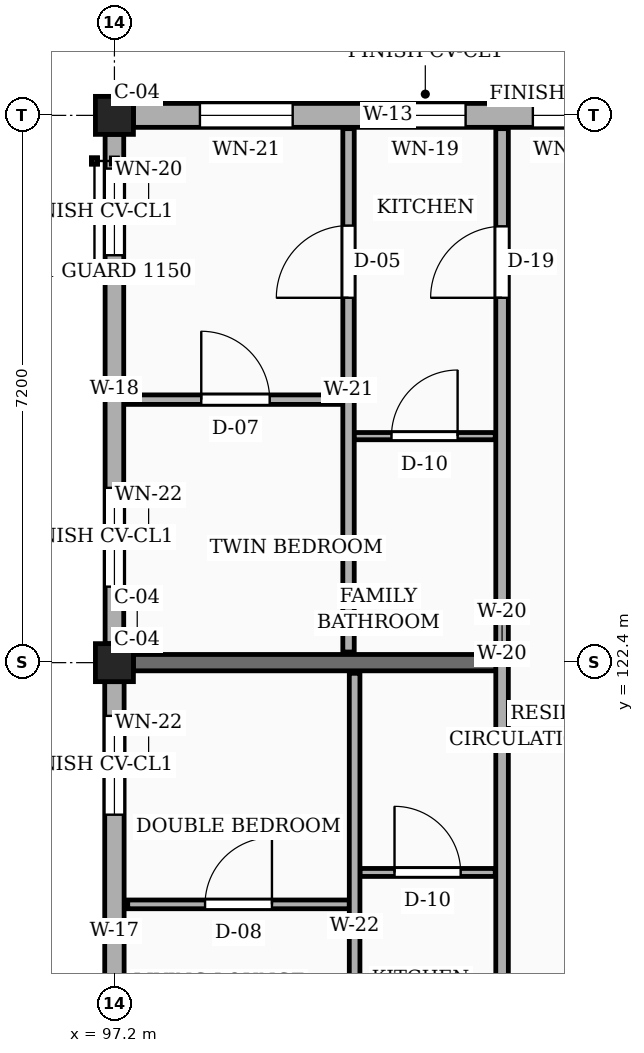
"""IFC4 building model, lengths in metres.
Left out: names, types, materials, properties, quantities, classifications, styles, units other than length and angle.
Written with IfcOpenShell. Run it as: python <this file> out.ifc"""

import sys

from ifc_helpers import new_model, si_unit, direction, frame, frame_2d, origin, origin_2d, place, context, subcontext, project, spatial, rectangle, extrude, element, fill, save


model = new_model("IFC4")
c1 = context("Model", 3, precision=1e-05, world=origin(), true_north=direction((0.0, 1.0)))
c2 = subcontext(c1, "Body", "Model", "MODEL_VIEW")
j1 = project(units=[si_unit("LENGTHUNIT", "METRE"), si_unit("PLANEANGLEUNIT", "RADIAN")], contexts=[c1])
p1 = place(None, origin())
s1 = spatial("IfcSite", under=j1, at=p1, CompositionType="ELEMENT")
p2 = place(p1, origin())
s2 = spatial("IfcBuilding", under=s1, at=p2, CompositionType="ELEMENT")
p3 = place(p2, frame((0.0, 0.0, 26.55)))
s3 = spatial("IfcBuildingStorey", under=s2, at=p3, CompositionType="ELEMENT", Elevation=26.55)
for number, where, z_axis, x_axis in (
    (1, (97.2, 122.4, 0.0), (0.0, 0.0, 1.0), (1.0, 0.0, 0.0)),
    (2, (97.2, 129.6, 0.0), (0.0, 0.0, 1.0), (1.0, 0.0, 0.0)),
):
    element("IfcColumn", number, at=place(p3, frame(where, z_axis=z_axis, x_axis=x_axis)), inside=s3, PredefinedType="COLUMN", context=c2, shape_type="SweptSolid", body=[
        extrude(rectangle(XDim=0.5, YDim=0.5, at=origin_2d()), origin(), (0.0, 0.0, 1.0), 3.15),
    ])
p4 = place(p3, frame((97.45, 122.4, 0.0), z_axis=(0.0, 0.0, 1.0), x_axis=(1.0, 0.0, 0.0)))
e3 = element("IfcWall", 3, at=p4, inside=s3, PredefinedType="SOLIDWALL", context=c2, shape_type="SweptSolid", body=[
    extrude(rectangle(XDim=4.85, YDim=0.215, at=frame_2d((2.425, 0.0))), origin(), (0.0, 0.0, 1.0), 2.19),
])
p5 = place(p3, frame((104.15, 129.6, 0.0), z_axis=(0.0, 0.0, 1.0), x_axis=(-1.0, 0.0, 0.0)))
e4 = element("IfcWall", 4, at=p5, inside=s3, PredefinedType="SOLIDWALL", context=c2, shape_type="SweptSolid", body=[
    extrude(rectangle(XDim=6.7, YDim=0.315, at=frame_2d((3.35, 0.0))), origin(), (0.0, 0.0, 1.0), 2.46),
])
p6 = place(p5, frame((0.545, 0.0, 0.78)))
e5 = element("IfcOpeningElement", 5, at=p6, cuts=e4, PredefinedType="OPENING", context=c2, shape_type="SweptSolid", body=[
    extrude(rectangle(XDim=0.9, YDim=1.36, at=frame_2d((0.45, 0.68))), frame((0.0, 0.167, 0.0), z_axis=(0.0, -1.0, 0.0), x_axis=(1.0, 0.0, 0.0)), (0.0, 0.0, 1.0), 0.335),
])
p7 = place(p5, frame((2.33, 0.0, 0.78)))
e6 = element("IfcOpeningElement", 6, at=p7, cuts=e4, PredefinedType="OPENING", context=c2, shape_type="SweptSolid", body=[
    extrude(rectangle(XDim=1.06, YDim=1.36, at=frame_2d((0.53, 0.68))), frame((0.0, 0.167, 0.0), z_axis=(0.0, -1.0, 0.0), x_axis=(1.0, 0.0, 0.0)), (0.0, 0.0, 1.0), 0.335),
])
p8 = place(p5, frame((4.605, 0.0, 0.78)))
e7 = element("IfcOpeningElement", 7, at=p8, cuts=e4, PredefinedType="OPENING", context=c2, shape_type="SweptSolid", body=[
    extrude(rectangle(XDim=1.22, YDim=1.36, at=frame_2d((0.61, 0.68))), frame((0.0, 0.167, 0.0), z_axis=(0.0, -1.0, 0.0), x_axis=(1.0, 0.0, 0.0)), (0.0, 0.0, 1.0), 0.335),
])
p9 = place(p3, frame((97.2, 129.35, 0.0), z_axis=(0.0, 0.0, 1.0), x_axis=(0.0, -1.0, 0.0)))
e8 = element("IfcWall", 8, at=p9, inside=s3, PredefinedType="SOLIDWALL", context=c2, shape_type="SweptSolid", body=[
    extrude(rectangle(XDim=6.7, YDim=0.245, at=frame_2d((3.35, 0.0))), origin(), (0.0, 0.0, 1.0), 2.46),
])
p10 = place(p9, frame((0.45, 0.0, 0.78)))
e9 = element("IfcOpeningElement", 9, at=p10, cuts=e8, PredefinedType="OPENING", context=c2, shape_type="SweptSolid", body=[
    extrude(rectangle(XDim=1.14, YDim=1.36, at=frame_2d((0.57, 0.68))), frame((0.0, 0.133, 0.0), z_axis=(0.0, -1.0, 0.0), x_axis=(1.0, 0.0, 0.0)), (0.0, 0.0, 1.0), 0.265),
])
p11 = place(p9, frame((4.65, 0.0, 0.78)))
e10 = element("IfcOpeningElement", 10, at=p11, cuts=e8, PredefinedType="OPENING", context=c2, shape_type="SweptSolid", body=[
    extrude(rectangle(XDim=1.3, YDim=1.36, at=frame_2d((0.65, 0.68))), frame((0.0, 0.133, 0.0), z_axis=(0.0, -1.0, 0.0), x_axis=(1.0, 0.0, 0.0)), (0.0, 0.0, 1.0), 0.265),
])
p12 = place(p3, frame((97.2, 122.15, 0.0), z_axis=(0.0, 0.0, 1.0), x_axis=(0.0, -1.0, 0.0)))
e11 = element("IfcWall", 11, at=p12, inside=s3, PredefinedType="SOLIDWALL", context=c2, shape_type="SweptSolid", body=[
    extrude(rectangle(XDim=6.7, YDim=0.255, at=frame_2d((3.35, 0.0))), origin(), (0.0, 0.0, 1.0), 2.46),
])
p13 = place(p12, frame((0.45, 0.0, 0.78)))
e12 = element("IfcOpeningElement", 12, at=p13, cuts=e11, PredefinedType="OPENING", context=c2, shape_type="SweptSolid", body=[
    extrude(rectangle(XDim=1.3, YDim=1.36, at=frame_2d((0.65, 0.68))), frame((0.0, 0.137, 0.0), z_axis=(0.0, -1.0, 0.0), x_axis=(1.0, 0.0, 0.0)), (0.0, 0.0, 1.0), 0.275),
])
p14 = place(p12, frame((4.65, 0.0, 0.78)))
e13 = element("IfcOpeningElement", 13, at=p14, cuts=e11, PredefinedType="OPENING", context=c2, shape_type="SweptSolid", body=[
    extrude(rectangle(XDim=1.46, YDim=1.36, at=frame_2d((0.73, 0.68))), frame((0.0, 0.137, 0.0), z_axis=(0.0, -1.0, 0.0), x_axis=(1.0, 0.0, 0.0)), (0.0, 0.0, 1.0), 0.275),
])
p15 = place(p3, frame((102.3, 115.22, 0.0), z_axis=(0.0, 0.0, 1.0), x_axis=(0.0, 1.0, 0.0)))
e14 = element("IfcWall", 14, at=p15, inside=s3, PredefinedType="PARTITIONING", context=c2, shape_type="SweptSolid", body=[
    extrude(rectangle(XDim=7.16, YDim=0.165, at=frame_2d((3.58, 0.0))), origin(), (0.0, 0.0, 1.0), 2.325),
])
p16 = place(p15, frame((1.33, 0.0, 0.0)))
e15 = element("IfcOpeningElement", 15, at=p16, cuts=e14, PredefinedType="OPENING", context=c2, shape_type="SweptSolid", body=[
    extrude(rectangle(XDim=1.0, YDim=2.15, at=frame_2d((0.5, 1.075))), frame((0.0, 0.093, 0.0), z_axis=(0.0, -1.0, 0.0), x_axis=(1.0, 0.0, 0.0)), (0.0, 0.0, 1.0), 0.185),
])
p17 = place(p3, frame((102.3, 122.42, 0.0), z_axis=(0.0, 0.0, 1.0), x_axis=(0.0, 1.0, 0.0)))
e16 = element("IfcWall", 16, at=p17, inside=s3, PredefinedType="PARTITIONING", context=c2, shape_type="SweptSolid", body=[
    extrude(rectangle(XDim=7.005, YDim=0.165, at=frame_2d((3.502, 0.0))), origin(), (0.0, 0.0, 1.0), 2.325),
])
p18 = place(p17, frame((4.78, 0.0, 0.0)))
e17 = element("IfcOpeningElement", 17, at=p18, cuts=e16, PredefinedType="OPENING", context=c2, shape_type="SweptSolid", body=[
    extrude(rectangle(XDim=0.94, YDim=2.12, at=frame_2d((0.47, 1.06))), frame((0.0, 0.093, 0.0), z_axis=(0.0, -1.0, 0.0), x_axis=(1.0, 0.0, 0.0)), (0.0, 0.0, 1.0), 0.185),
])
p19 = place(p3, frame((97.375, 119.22, 0.0), z_axis=(0.0, 0.0, 1.0), x_axis=(1.0, 0.0, 0.0)))
e18 = element("IfcWall", 18, at=p19, inside=s3, PredefinedType="PARTITIONING", context=c2, shape_type="SweptSolid", body=[
    extrude(rectangle(XDim=2.915, YDim=0.115, at=frame_2d((1.458, 0.0))), origin(), (0.0, 0.0, 1.0), 2.325),
])
p20 = place(p19, frame((1.018, 0.0, 0.0)))
e19 = element("IfcOpeningElement", 19, at=p20, cuts=e18, PredefinedType="OPENING", context=c2, shape_type="SweptSolid", body=[
    extrude(rectangle(XDim=0.88, YDim=2.08, at=frame_2d((0.44, 1.04))), frame((0.0, 0.067, 0.0), z_axis=(0.0, -1.0, 0.0), x_axis=(1.0, 0.0, 0.0)), (0.0, 0.0, 1.0), 0.135),
])
p21 = place(p3, frame((100.43, 119.64, 0.0), z_axis=(0.0, 0.0, 1.0), x_axis=(1.0, 0.0, 0.0)))
e20 = element("IfcWall", 20, at=p21, inside=s3, PredefinedType="PARTITIONING", context=c2, shape_type="SweptSolid", body=[
    extrude(rectangle(XDim=1.78, YDim=0.105, at=frame_2d((0.89, 0.0))), origin(), (0.0, 0.0, 1.0), 2.325),
])
p22 = place(p21, frame((0.455, 0.0, 0.0)))
e21 = element("IfcOpeningElement", 21, at=p22, cuts=e20, PredefinedType="OPENING", context=c2, shape_type="SweptSolid", body=[
    extrude(rectangle(XDim=0.87, YDim=2.05, at=frame_2d((0.435, 1.025))), frame((0.0, 0.062, 0.0), z_axis=(0.0, -1.0, 0.0), x_axis=(1.0, 0.0, 0.0)), (0.0, 0.0, 1.0), 0.125),
])
p23 = place(p3, frame((100.36, 115.34, 0.0), z_axis=(0.0, 0.0, 1.0), x_axis=(0.0, 1.0, 0.0)))
e22 = element("IfcWall", 22, at=p23, inside=s3, PredefinedType="PARTITIONING", context=c2, shape_type="SweptSolid", body=[
    extrude(rectangle(XDim=6.92, YDim=0.14, at=frame_2d((3.46, 0.0))), origin(), (0.0, 0.0, 1.0), 2.325),
])
p24 = place(p23, frame((1.31, 0.0, 0.0)))
e23 = element("IfcOpeningElement", 23, at=p24, cuts=e22, PredefinedType="OPENING", context=c2, shape_type="SweptSolid", body=[
    extrude(rectangle(XDim=0.92, YDim=2.1, at=frame_2d((0.46, 1.05))), frame((0.0, 0.08, 0.0), z_axis=(0.0, -1.0, 0.0), x_axis=(1.0, 0.0, 0.0)), (0.0, 0.0, 1.0), 0.16),
])
p25 = place(p3, frame((97.375, 125.86, 0.0), z_axis=(0.0, 0.0, 1.0), x_axis=(1.0, 0.0, 0.0)))
e24 = element("IfcWall", 24, at=p25, inside=s3, PredefinedType="PARTITIONING", context=c2, shape_type="SweptSolid", body=[
    extrude(rectangle(XDim=2.835, YDim=0.125, at=frame_2d((1.417, 0.0))), origin(), (0.0, 0.0, 1.0), 2.325),
])
p26 = place(p25, frame((0.968, 0.0, 0.0)))
e25 = element("IfcOpeningElement", 25, at=p26, cuts=e24, PredefinedType="OPENING", context=c2, shape_type="SweptSolid", body=[
    extrude(rectangle(XDim=0.9, YDim=2.1, at=frame_2d((0.45, 1.05))), frame((0.0, 0.073, 0.0), z_axis=(0.0, -1.0, 0.0), x_axis=(1.0, 0.0, 0.0)), (0.0, 0.0, 1.0), 0.145),
])
p27 = place(p3, frame((100.35, 125.38, 0.0), z_axis=(0.0, 0.0, 1.0), x_axis=(1.0, 0.0, 0.0)))
e26 = element("IfcWall", 26, at=p27, inside=s3, PredefinedType="PARTITIONING", context=c2, shape_type="SweptSolid", body=[
    extrude(rectangle(XDim=1.86, YDim=0.095, at=frame_2d((0.93, 0.0))), origin(), (0.0, 0.0, 1.0), 2.325),
])
p28 = place(p27, frame((0.495, 0.0, 0.0)))
e27 = element("IfcOpeningElement", 27, at=p28, cuts=e26, PredefinedType="OPENING", context=c2, shape_type="SweptSolid", body=[
    extrude(rectangle(XDim=0.87, YDim=2.05, at=frame_2d((0.435, 1.025))), frame((0.0, 0.058, 0.0), z_axis=(0.0, -1.0, 0.0), x_axis=(1.0, 0.0, 0.0)), (0.0, 0.0, 1.0), 0.115),
])
p29 = place(p3, frame((100.28, 122.54, 0.0), z_axis=(0.0, 0.0, 1.0), x_axis=(0.0, 1.0, 0.0)))
e28 = element("IfcWall", 28, at=p29, inside=s3, PredefinedType="PARTITIONING", context=c2, shape_type="SweptSolid", body=[
    extrude(rectangle(XDim=6.885, YDim=0.15, at=frame_2d((3.442, 0.0))), origin(), (0.0, 0.0, 1.0), 2.325),
])
p30 = place(p29, frame((4.66, 0.0, 0.0)))
e29 = element("IfcOpeningElement", 29, at=p30, cuts=e28, PredefinedType="OPENING", context=c2, shape_type="SweptSolid", body=[
    extrude(rectangle(XDim=0.95, YDim=2.1, at=frame_2d((0.475, 1.05))), frame((0.0, 0.085, 0.0), z_axis=(0.0, -1.0, 0.0), x_axis=(1.0, 0.0, 0.0)), (0.0, 0.0, 1.0), 0.17),
])
p31 = place(p6, origin())
e30 = element("IfcWindow", 30, at=p31, inside=s3, PartitioningType="SINGLE_PANEL", PredefinedType="WINDOW", context=c2, shape_type="SweptSolid", body=[
    extrude(rectangle(XDim=0.9, YDim=1.36, at=frame_2d((0.45, 0.68))), frame((0.0, 0.03, 0.0), z_axis=(0.0, -1.0, 0.0), x_axis=(1.0, 0.0, 0.0)), (0.0, 0.0, 1.0), 0.06),
])
fill(e5, e30)
p32 = place(p7, origin())
e31 = element("IfcWindow", 31, at=p32, inside=s3, PartitioningType="SINGLE_PANEL", PredefinedType="WINDOW", context=c2, shape_type="SweptSolid", body=[
    extrude(rectangle(XDim=1.06, YDim=1.36, at=frame_2d((0.53, 0.68))), frame((0.0, 0.03, 0.0), z_axis=(0.0, -1.0, 0.0), x_axis=(1.0, 0.0, 0.0)), (0.0, 0.0, 1.0), 0.06),
])
fill(e6, e31)
p33 = place(p8, origin())
e32 = element("IfcWindow", 32, at=p33, inside=s3, PartitioningType="SINGLE_PANEL", PredefinedType="WINDOW", context=c2, shape_type="SweptSolid", body=[
    extrude(rectangle(XDim=1.22, YDim=1.36, at=frame_2d((0.61, 0.68))), frame((0.0, 0.03, 0.0), z_axis=(0.0, -1.0, 0.0), x_axis=(1.0, 0.0, 0.0)), (0.0, 0.0, 1.0), 0.06),
])
fill(e7, e32)
p34 = place(p10, origin())
e33 = element("IfcWindow", 33, at=p34, inside=s3, PartitioningType="SINGLE_PANEL", PredefinedType="WINDOW", context=c2, shape_type="SweptSolid", body=[
    extrude(rectangle(XDim=1.14, YDim=1.36, at=frame_2d((0.57, 0.68))), frame((0.0, 0.03, 0.0), z_axis=(0.0, -1.0, 0.0), x_axis=(1.0, 0.0, 0.0)), (0.0, 0.0, 1.0), 0.06),
])
fill(e9, e33)
p35 = place(p11, origin())
e34 = element("IfcWindow", 34, at=p35, inside=s3, PartitioningType="SINGLE_PANEL", PredefinedType="WINDOW", context=c2, shape_type="SweptSolid", body=[
    extrude(rectangle(XDim=1.3, YDim=1.36, at=frame_2d((0.65, 0.68))), frame((0.0, 0.03, 0.0), z_axis=(0.0, -1.0, 0.0), x_axis=(1.0, 0.0, 0.0)), (0.0, 0.0, 1.0), 0.06),
])
fill(e10, e34)
p36 = place(p13, origin())
e35 = element("IfcWindow", 35, at=p36, inside=s3, PartitioningType="SINGLE_PANEL", PredefinedType="WINDOW", context=c2, shape_type="SweptSolid", body=[
    extrude(rectangle(XDim=1.3, YDim=1.36, at=frame_2d((0.65, 0.68))), frame((0.0, 0.03, 0.0), z_axis=(0.0, -1.0, 0.0), x_axis=(1.0, 0.0, 0.0)), (0.0, 0.0, 1.0), 0.06),
])
fill(e12, e35)
p37 = place(p18, origin())
e36 = element("IfcDoor", 36, at=p37, inside=s3, OperationType="SINGLE_SWING_LEFT", PredefinedType="DOOR", context=c2, shape_type="SweptSolid", body=[
    extrude(rectangle(XDim=0.94, YDim=2.12, at=frame_2d((0.47, 1.06))), frame((0.0, 0.025, 0.0), z_axis=(0.0, -1.0, 0.0), x_axis=(1.0, 0.0, 0.0)), (0.0, 0.0, 1.0), 0.05),
])
fill(e17, e36)
p38 = place(p20, origin())
e37 = element("IfcDoor", 37, at=p38, inside=s3, OperationType="SINGLE_SWING_RIGHT", PredefinedType="DOOR", context=c2, shape_type="SweptSolid", body=[
    extrude(rectangle(XDim=0.88, YDim=2.08, at=frame_2d((0.44, 1.04))), frame((0.0, 0.025, 0.0), z_axis=(0.0, -1.0, 0.0), x_axis=(1.0, 0.0, 0.0)), (0.0, 0.0, 1.0), 0.05),
])
fill(e19, e37)
p39 = place(p22, origin())
e38 = element("IfcDoor", 38, at=p39, inside=s3, OperationType="SINGLE_SWING_LEFT", PredefinedType="DOOR", context=c2, shape_type="SweptSolid", body=[
    extrude(rectangle(XDim=0.87, YDim=2.05, at=frame_2d((0.435, 1.025))), frame((0.0, 0.025, 0.0), z_axis=(0.0, -1.0, 0.0), x_axis=(1.0, 0.0, 0.0)), (0.0, 0.0, 1.0), 0.05),
])
fill(e21, e38)
p40 = place(p26, origin())
e39 = element("IfcDoor", 39, at=p40, inside=s3, OperationType="SINGLE_SWING_LEFT", PredefinedType="DOOR", context=c2, shape_type="SweptSolid", body=[
    extrude(rectangle(XDim=0.9, YDim=2.1, at=frame_2d((0.45, 1.05))), frame((0.0, 0.025, 0.0), z_axis=(0.0, -1.0, 0.0), x_axis=(1.0, 0.0, 0.0)), (0.0, 0.0, 1.0), 0.05),
])
fill(e25, e39)
p41 = place(p28, origin())
e40 = element("IfcDoor", 40, at=p41, inside=s3, OperationType="SINGLE_SWING_RIGHT", PredefinedType="DOOR", context=c2, shape_type="SweptSolid", body=[
    extrude(rectangle(XDim=0.87, YDim=2.05, at=frame_2d((0.435, 1.025))), frame((0.0, 0.025, 0.0), z_axis=(0.0, -1.0, 0.0), x_axis=(1.0, 0.0, 0.0)), (0.0, 0.0, 1.0), 0.05),
])
fill(e27, e40)
p42 = place(p30, origin())
e41 = element("IfcDoor", 41, at=p42, inside=s3, OperationType="SINGLE_SWING_LEFT", PredefinedType="DOOR", context=c2, shape_type="SweptSolid", body=[
    extrude(rectangle(XDim=0.95, YDim=2.1, at=frame_2d((0.475, 1.05))), frame((0.0, 0.025, 0.0), z_axis=(0.0, -1.0, 0.0), x_axis=(1.0, 0.0, 0.0)), (0.0, 0.0, 1.0), 0.05),
])
fill(e29, e41)
save(model, sys.argv[1])
